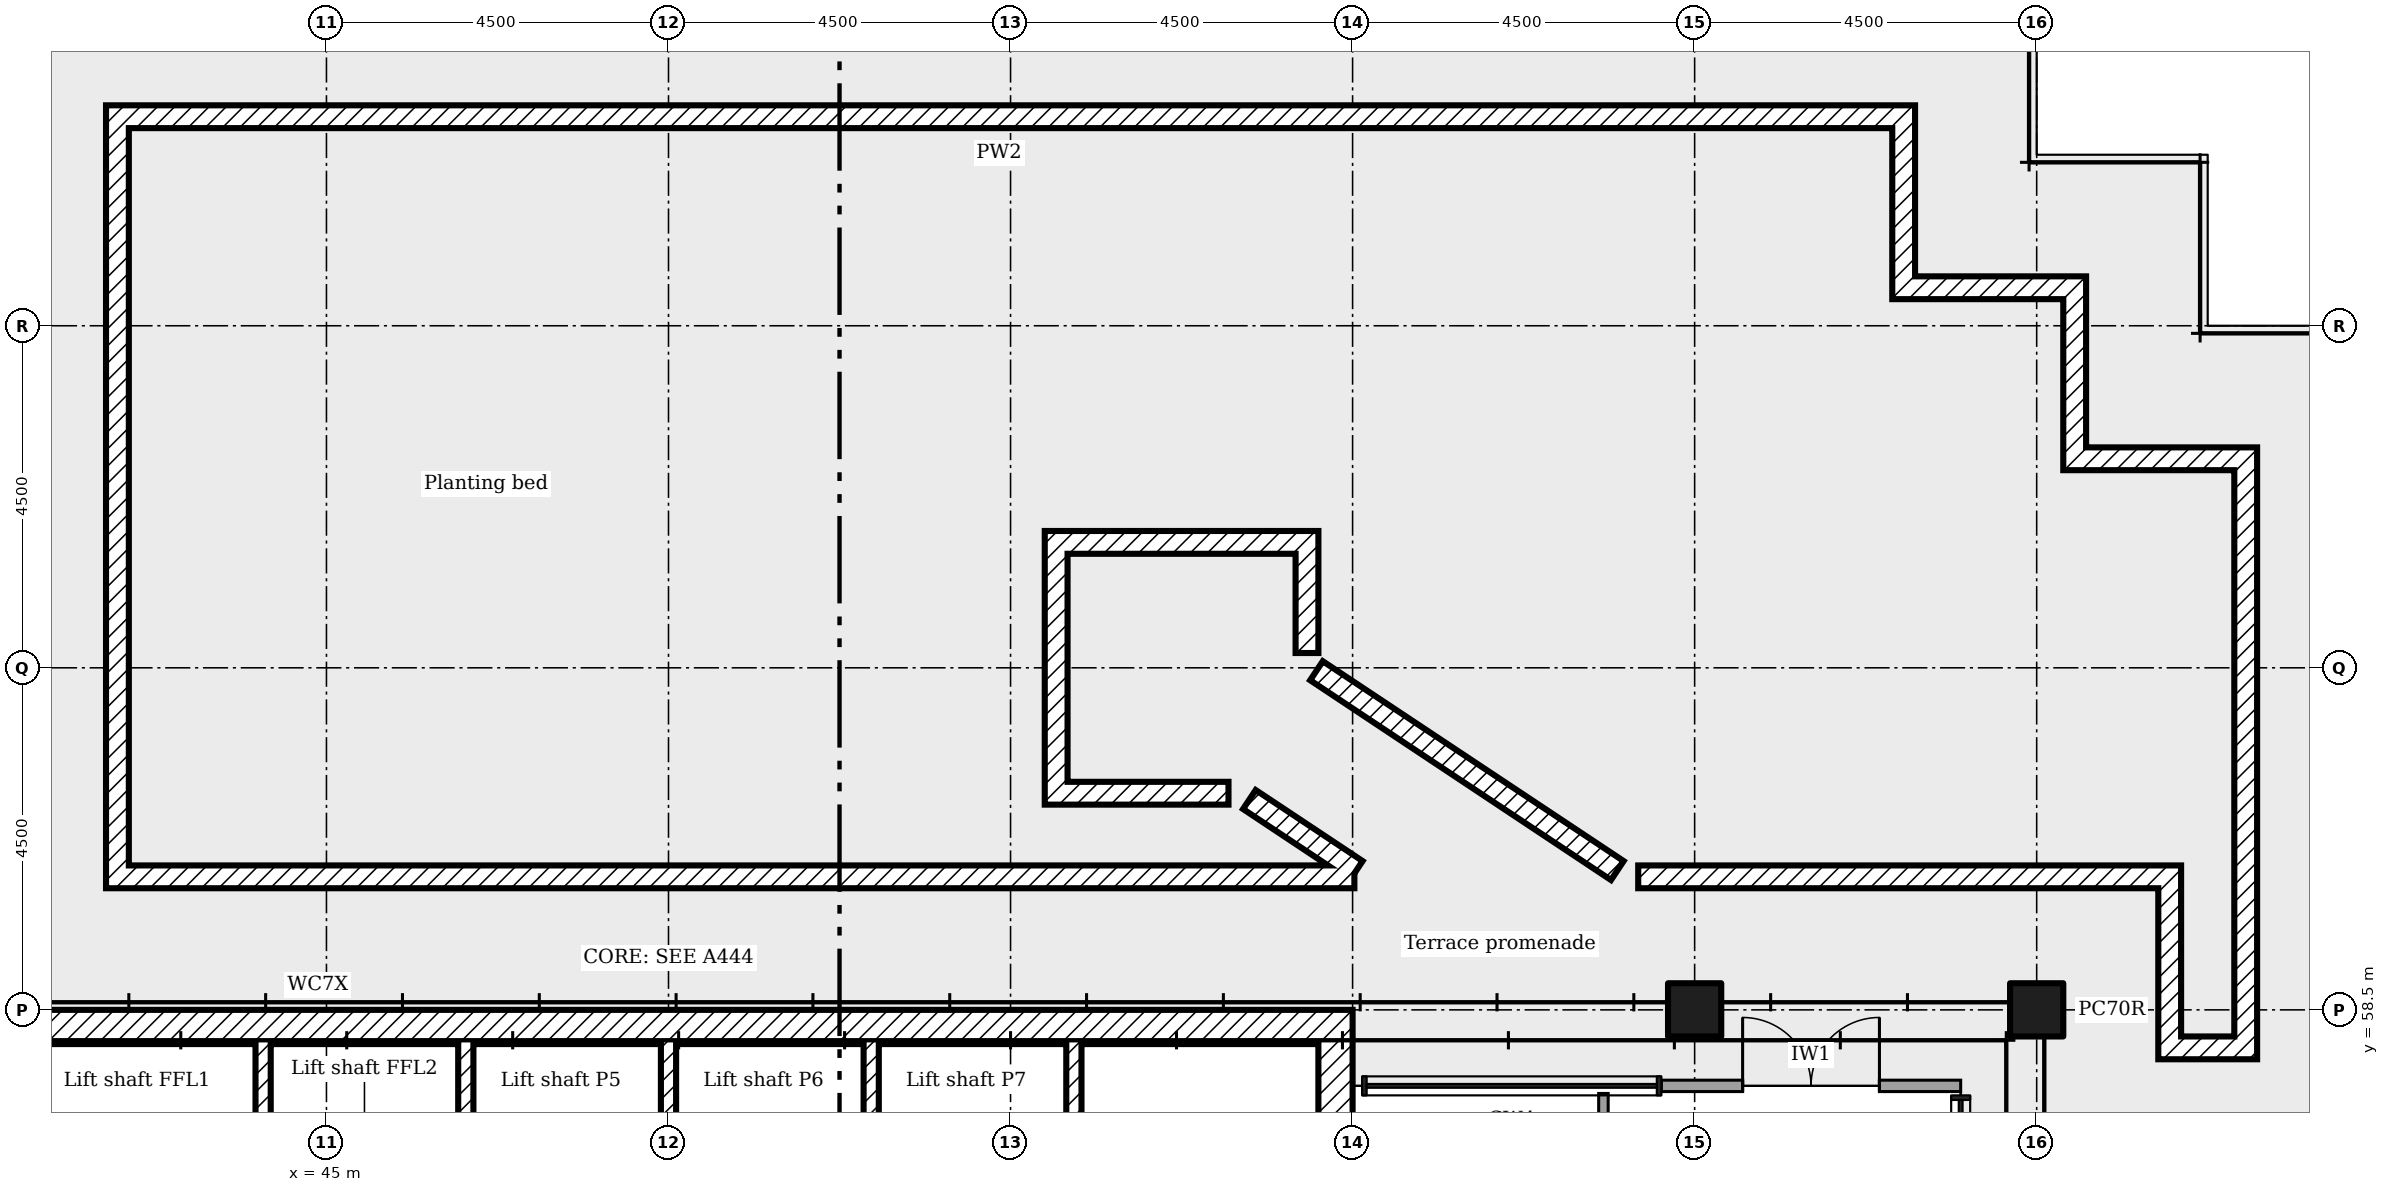
"""IFC4 building model, lengths in metres.
Left out: names, types, materials, properties, quantities, classifications, styles, units other than length and angle.
Written with IfcOpenShell. Run it as: python <this file> out.ifc"""

import sys

from ifc_helpers import new_model, si_unit, direction, frame, frame_2d, origin, origin_2d, place, context, subcontext, project, spatial, rectangle, extrude, element, fill, save


model = new_model("IFC4")
c1 = context("Model", 3, precision=1e-05, world=origin(), true_north=direction((0.0, 1.0)))
c2 = subcontext(c1, "Body", "Model", "MODEL_VIEW")
j1 = project(units=[si_unit("LENGTHUNIT", "METRE"), si_unit("PLANEANGLEUNIT", "RADIAN")], contexts=[c1])
p1 = place(None, origin())
s1 = spatial("IfcSite", under=j1, at=p1, CompositionType="ELEMENT")
p2 = place(p1, origin())
s2 = spatial("IfcBuilding", under=s1, at=p2, CompositionType="ELEMENT")
p3 = place(p2, frame((0.0, 0.0, 263.6)))
s3 = spatial("IfcBuildingStorey", under=s2, at=p3, CompositionType="ELEMENT", Elevation=263.6)
for number, where in (
    (1, (67.5, 58.5, 0.0)),
    (2, (63.0, 58.5, 0.0)),
):
    element("IfcColumn", number, at=place(p3, frame(where)), inside=s3, PredefinedType="COLUMN", context=c2, shape_type="SweptSolid", body=[
        extrude(rectangle(XDim=0.7, YDim=0.7, at=origin_2d()), origin(), (0.0, 0.0, 1.0), 6.0),
    ])
p4 = place(p3, frame((66.5, 57.5, 0.0), z_axis=(0.0, 0.0, 1.0), x_axis=(-1.0, 0.0, 0.0)))
e3 = element("IfcWall", 3, at=p4, inside=s3, PredefinedType="SOLIDWALL", context=c2, shape_type="SweptSolid", body=[
    extrude(rectangle(XDim=3.938, YDim=0.15, at=frame_2d((1.969, 0.0))), origin(), (0.0, 0.0, 1.0), 5.825),
])
p5 = place(p4, frame((1.069, 0.0, 0.0)))
e4 = element("IfcOpeningElement", 4, at=p5, cuts=e3, PredefinedType="OPENING", context=c2, shape_type="SweptSolid", body=[
    extrude(rectangle(XDim=1.8, YDim=2.4, at=frame_2d((0.9, 1.2))), frame((0.0, 0.085, 0.0), z_axis=(0.0, -1.0, 0.0), x_axis=(1.0, 0.0, 0.0)), (0.0, 0.0, 1.0), 0.17),
])
p6 = place(p3, frame((65.75, 67.85, 0.0), z_axis=(0.0, 0.0, 1.0), x_axis=(0.0, 1.0, 0.0)))
e5 = element("IfcWall", 5, at=p6, inside=s3, PredefinedType="SOLIDWALL", context=c2, shape_type="SweptSolid", body=[
    extrude(rectangle(XDim=2.55, YDim=0.3, at=frame_2d((1.275, 0.0))), origin(), (0.0, 0.0, 1.0), 0.6),
])
p7 = place(p3, frame((65.6, 70.25, 0.0), z_axis=(0.0, 0.0, 1.0), x_axis=(-1.0, 0.0, 0.0)))
e6 = element("IfcWall", 6, at=p7, inside=s3, PredefinedType="SOLIDWALL", context=c2, shape_type="SweptSolid", body=[
    extrude(rectangle(XDim=23.5, YDim=0.3, at=frame_2d((11.75, 0.0))), origin(), (0.0, 0.0, 1.0), 0.6),
])
p8 = place(p3, frame((42.25, 70.1, 0.0), z_axis=(0.0, 0.0, 1.0), x_axis=(0.0, -1.0, 0.0)))
e7 = element("IfcWall", 7, at=p8, inside=s3, PredefinedType="SOLIDWALL", context=c2, shape_type="SweptSolid", body=[
    extrude(rectangle(XDim=10.0, YDim=0.3, at=frame_2d((5.0, 0.0))), origin(), (0.0, 0.0, 1.0), 0.6),
])
p9 = place(p3, frame((42.4, 60.25, 0.0)))
e8 = element("IfcWall", 8, at=p9, inside=s3, PredefinedType="SOLIDWALL", context=c2, shape_type="SweptSolid", body=[
    extrude(rectangle(XDim=16.124, YDim=0.3, at=frame_2d((8.062, 0.0))), origin(), (0.0, 0.0, 1.0), 0.6),
])
p10 = place(p3, frame((58.549, 60.333, 0.0), z_axis=(0.0, 0.0, 1.0), x_axis=(-0.83302781468, 0.553231109003, 0.0)))
e9 = element("IfcWall", 9, at=p10, inside=s3, PredefinedType="SOLIDWALL", context=c2, shape_type="SweptSolid", body=[
    extrude(rectangle(XDim=1.688, YDim=0.3, at=frame_2d((0.844, 0.0))), origin(), (0.0, 0.0, 1.0), 0.6),
])
p11 = place(p3, frame((56.867, 61.35, 0.0), z_axis=(0.0, 0.0, 1.0), x_axis=(-1.0, 0.0, 0.0)))
e10 = element("IfcWall", 10, at=p11, inside=s3, PredefinedType="SOLIDWALL", context=c2, shape_type="SweptSolid", body=[
    extrude(rectangle(XDim=2.417, YDim=0.3, at=frame_2d((1.208, 0.0))), origin(), (0.0, 0.0, 1.0), 0.6),
])
p12 = place(p3, frame((54.6, 61.5, 0.0), z_axis=(0.0, 0.0, 1.0), x_axis=(0.0, 1.0, 0.0)))
e11 = element("IfcWall", 11, at=p12, inside=s3, PredefinedType="SOLIDWALL", context=c2, shape_type="SweptSolid", body=[
    extrude(rectangle(XDim=3.3, YDim=0.3, at=frame_2d((1.65, 0.0))), origin(), (0.0, 0.0, 1.0), 0.6),
])
p13 = place(p3, frame((54.75, 64.65, 0.0)))
e12 = element("IfcWall", 12, at=p13, inside=s3, PredefinedType="SOLIDWALL", context=c2, shape_type="SweptSolid", body=[
    extrude(rectangle(XDim=3.3, YDim=0.3, at=frame_2d((1.65, 0.0))), origin(), (0.0, 0.0, 1.0), 0.6),
])
p14 = place(p3, frame((57.9, 64.5, 0.0), z_axis=(0.0, 0.0, 1.0), x_axis=(0.0, -1.0, 0.0)))
e13 = element("IfcWall", 13, at=p14, inside=s3, PredefinedType="SOLIDWALL", context=c2, shape_type="SweptSolid", body=[
    extrude(rectangle(XDim=1.305, YDim=0.3, at=frame_2d((0.653, 0.0))), origin(), (0.0, 0.0, 1.0), 0.6),
])
p15 = place(p3, frame((58.025, 62.962, 0.0), z_axis=(0.0, 0.0, 1.0), x_axis=(0.833005612602, -0.553264538331, 0.0)))
e14 = element("IfcWall", 14, at=p15, inside=s3, PredefinedType="SOLIDWALL", context=c2, shape_type="SweptSolid", body=[
    extrude(rectangle(XDim=4.751, YDim=0.3, at=frame_2d((2.375, 0.0))), origin(), (0.0, 0.0, 1.0), 0.6),
])
p16 = place(p3, frame((62.258, 60.25, 0.0)))
e15 = element("IfcWall", 15, at=p16, inside=s3, PredefinedType="SOLIDWALL", context=c2, shape_type="SweptSolid", body=[
    extrude(rectangle(XDim=7.142, YDim=0.3, at=frame_2d((3.571, 0.0))), origin(), (0.0, 0.0, 1.0), 0.6),
])
p17 = place(p3, frame((69.25, 60.1, 0.0), z_axis=(0.0, 0.0, 1.0), x_axis=(0.0, -1.0, 0.0)))
e16 = element("IfcWall", 16, at=p17, inside=s3, PredefinedType="SOLIDWALL", context=c2, shape_type="SweptSolid", body=[
    extrude(rectangle(XDim=2.25, YDim=0.3, at=frame_2d((1.125, 0.0))), origin(), (0.0, 0.0, 1.0), 0.6),
])
p18 = place(p3, frame((69.4, 58.0, 0.0)))
e17 = element("IfcWall", 17, at=p18, inside=s3, PredefinedType="SOLIDWALL", context=c2, shape_type="SweptSolid", body=[
    extrude(rectangle(XDim=1.0, YDim=0.3, at=frame_2d((0.5, 0.0))), origin(), (0.0, 0.0, 1.0), 0.6),
])
p19 = place(p3, frame((70.25, 58.15, 0.0), z_axis=(0.0, 0.0, 1.0), x_axis=(0.0, 1.0, 0.0)))
e18 = element("IfcWall", 18, at=p19, inside=s3, PredefinedType="SOLIDWALL", context=c2, shape_type="SweptSolid", body=[
    extrude(rectangle(XDim=7.75, YDim=0.3, at=frame_2d((3.875, 0.0))), origin(), (0.0, 0.0, 1.0), 0.6),
])
for number, where, z_axis, x_axis in (
    (19, (70.1, 65.75, 0.0), (0.0, 0.0, 1.0), (-1.0, 0.0, 0.0)),
    (20, (68.0, 65.9, 0.0), (0.0, 0.0, 1.0), (0.0, 1.0, 0.0)),
):
    element("IfcWall", number, at=place(p3, frame(where, z_axis=z_axis, x_axis=x_axis)), inside=s3, PredefinedType="SOLIDWALL", context=c2, shape_type="SweptSolid", body=[
        extrude(rectangle(XDim=2.25, YDim=0.3, at=frame_2d((1.125, 0.0))), origin(), (0.0, 0.0, 1.0), 0.6),
    ])
p20 = place(p3, frame((67.85, 68.0, 0.0), z_axis=(0.0, 0.0, 1.0), x_axis=(-1.0, 0.0, 0.0)))
e21 = element("IfcWall", 21, at=p20, inside=s3, PredefinedType="SOLIDWALL", context=c2, shape_type="SweptSolid", body=[
    extrude(rectangle(XDim=1.95, YDim=0.3, at=frame_2d((0.975, 0.0))), origin(), (0.0, 0.0, 1.0), 0.6),
])
p21 = place(p3, frame((58.275, 40.5, 0.0), z_axis=(0.0, 0.0, 1.0), x_axis=(0.0, 1.0, 0.0)))
e22 = element("IfcWall", 22, at=p21, inside=s3, PredefinedType="SHEAR", context=c2, shape_type="SweptSolid", body=[
    extrude(rectangle(XDim=18.0, YDim=0.45, at=frame_2d((9.0, 0.0))), origin(), (0.0, 0.0, 1.0), 5.725),
])
p22 = place(p21, frame((13.15, 0.0, 0.0)))
e23 = element("IfcOpeningElement", 23, at=p22, cuts=e22, PredefinedType="OPENING", context=c2, shape_type="SweptSolid", body=[
    extrude(rectangle(XDim=1.2, YDim=2.1, at=frame_2d((0.6, 1.05))), frame((0.0, 0.235, 0.0), z_axis=(0.0, -1.0, 0.0), x_axis=(1.0, 0.0, 0.0)), (0.0, 0.0, 1.0), 0.47),
])
p23 = place(p21, frame((3.9, 0.0, 0.0)))
e24 = element("IfcOpeningElement", 24, at=p23, cuts=e22, PredefinedType="OPENING", context=c2, shape_type="SweptSolid", body=[
    extrude(rectangle(XDim=1.8, YDim=2.1, at=frame_2d((0.9, 1.05))), frame((0.0, 0.235, 0.0), z_axis=(0.0, -1.0, 0.0), x_axis=(1.0, 0.0, 0.0)), (0.0, 0.0, 1.0), 0.47),
])
p24 = place(p21, frame((11.34, 0.0, 0.0)))
e25 = element("IfcOpeningElement", 25, at=p24, cuts=e22, PredefinedType="OPENING", context=c2, shape_type="SweptSolid", body=[
    extrude(rectangle(XDim=1.2, YDim=2.1, at=frame_2d((0.6, 1.05))), frame((0.0, 0.235, 0.0), z_axis=(0.0, -1.0, 0.0), x_axis=(1.0, 0.0, 0.0)), (0.0, 0.0, 1.0), 0.47),
])
p25 = place(p3, frame((40.5, 58.275, 0.0)))
e26 = element("IfcWall", 26, at=p25, inside=s3, PredefinedType="SHEAR", context=c2, shape_type="SweptSolid", body=[
    extrude(rectangle(XDim=17.55, YDim=0.45, at=frame_2d((8.775, 0.0))), origin(), (0.0, 0.0, 1.0), 5.725),
])
p26 = place(p3, frame((44.167, 58.05, 0.0), z_axis=(0.0, 0.0, 1.0), x_axis=(0.0, -1.0, 0.0)))
e27 = element("IfcWall", 27, at=p26, inside=s3, PredefinedType="SHEAR", context=c2, shape_type="SweptSolid", body=[
    extrude(rectangle(XDim=3.65, YDim=0.2, at=frame_2d((1.825, 0.0))), origin(), (0.0, 0.0, 1.0), 5.725),
])
p27 = place(p3, frame((46.833, 58.05, 0.0), z_axis=(0.0, 0.0, 1.0), x_axis=(0.0, -1.0, 0.0)))
e28 = element("IfcWall", 28, at=p27, inside=s3, PredefinedType="SHEAR", context=c2, shape_type="SweptSolid", body=[
    extrude(rectangle(XDim=4.75, YDim=0.2, at=frame_2d((2.375, 0.0))), origin(), (0.0, 0.0, 1.0), 5.725),
])
for number, where, z_axis, x_axis in (
    (29, (49.5, 58.05, 0.0), (0.0, 0.0, 1.0), (0.0, -1.0, 0.0)),
    (30, (52.167, 58.05, 0.0), (0.0, 0.0, 1.0), (0.0, -1.0, 0.0)),
    (31, (54.833, 58.05, 0.0), (0.0, 0.0, 1.0), (0.0, -1.0, 0.0)),
):
    element("IfcWall", number, at=place(p3, frame(where, z_axis=z_axis, x_axis=x_axis)), inside=s3, PredefinedType="SHEAR", context=c2, shape_type="SweptSolid", body=[
        extrude(rectangle(XDim=2.85, YDim=0.2, at=frame_2d((1.425, 0.0))), origin(), (0.0, 0.0, 1.0), 5.725),
    ])
p28 = place(p3, frame((61.8, 38.762, 0.0), z_axis=(0.0, 0.0, 1.0), x_axis=(0.0, 1.0, 0.0)))
e32 = element("IfcWall", 32, at=p28, inside=s3, PredefinedType="PARTITIONING", context=c2, shape_type="SweptSolid", body=[
    extrude(rectangle(XDim=18.637, YDim=0.125, at=frame_2d((9.319, 0.0))), origin(), (0.0, 0.0, 1.0), 5.825),
])
p29 = place(p28, frame((3.488, 0.0, 0.0)))
e33 = element("IfcOpeningElement", 33, at=p29, cuts=e32, PredefinedType="OPENING", context=c2, shape_type="SweptSolid", body=[
    extrude(rectangle(XDim=1.0, YDim=2.1, at=frame_2d((0.5, 1.05))), frame((0.0, 0.073, 0.0), z_axis=(0.0, -1.0, 0.0), x_axis=(1.0, 0.0, 0.0)), (0.0, 0.0, 1.0), 0.145),
])
p30 = place(p28, frame((7.532, 0.0, 0.0)))
e34 = element("IfcOpeningElement", 34, at=p30, cuts=e32, PredefinedType="OPENING", context=c2, shape_type="SweptSolid", body=[
    extrude(rectangle(XDim=1.0, YDim=2.1, at=frame_2d((0.5, 1.05))), frame((0.0, 0.073, 0.0), z_axis=(0.0, -1.0, 0.0), x_axis=(1.0, 0.0, 0.0)), (0.0, 0.0, 1.0), 0.145),
])
p31 = place(p28, frame((15.238, 0.0, 0.0)))
e35 = element("IfcOpeningElement", 35, at=p31, cuts=e32, PredefinedType="OPENING", context=c2, shape_type="SweptSolid", body=[
    extrude(rectangle(XDim=1.0, YDim=2.1, at=frame_2d((0.5, 1.05))), frame((0.0, 0.073, 0.0), z_axis=(0.0, -1.0, 0.0), x_axis=(1.0, 0.0, 0.0)), (0.0, 0.0, 1.0), 0.145),
])
p32 = place(p5, frame((1.8, 0.0, 0.0), x_axis=(-1.0, 0.0, 0.0)))
e36 = element("IfcDoor", 36, at=p32, inside=s3, OperationType="DOUBLE_DOOR_DOUBLE_SWING", PredefinedType="NOTDEFINED", context=c2, shape_type="SweptSolid", body=[
    extrude(rectangle(XDim=1.8, YDim=2.4, at=frame_2d((0.9, 1.2))), frame((0.0, 0.025, 0.0), z_axis=(0.0, -1.0, 0.0), x_axis=(1.0, 0.0, 0.0)), (0.0, 0.0, 1.0), 0.05),
])
fill(e4, e36)
save(model, sys.argv[1])
